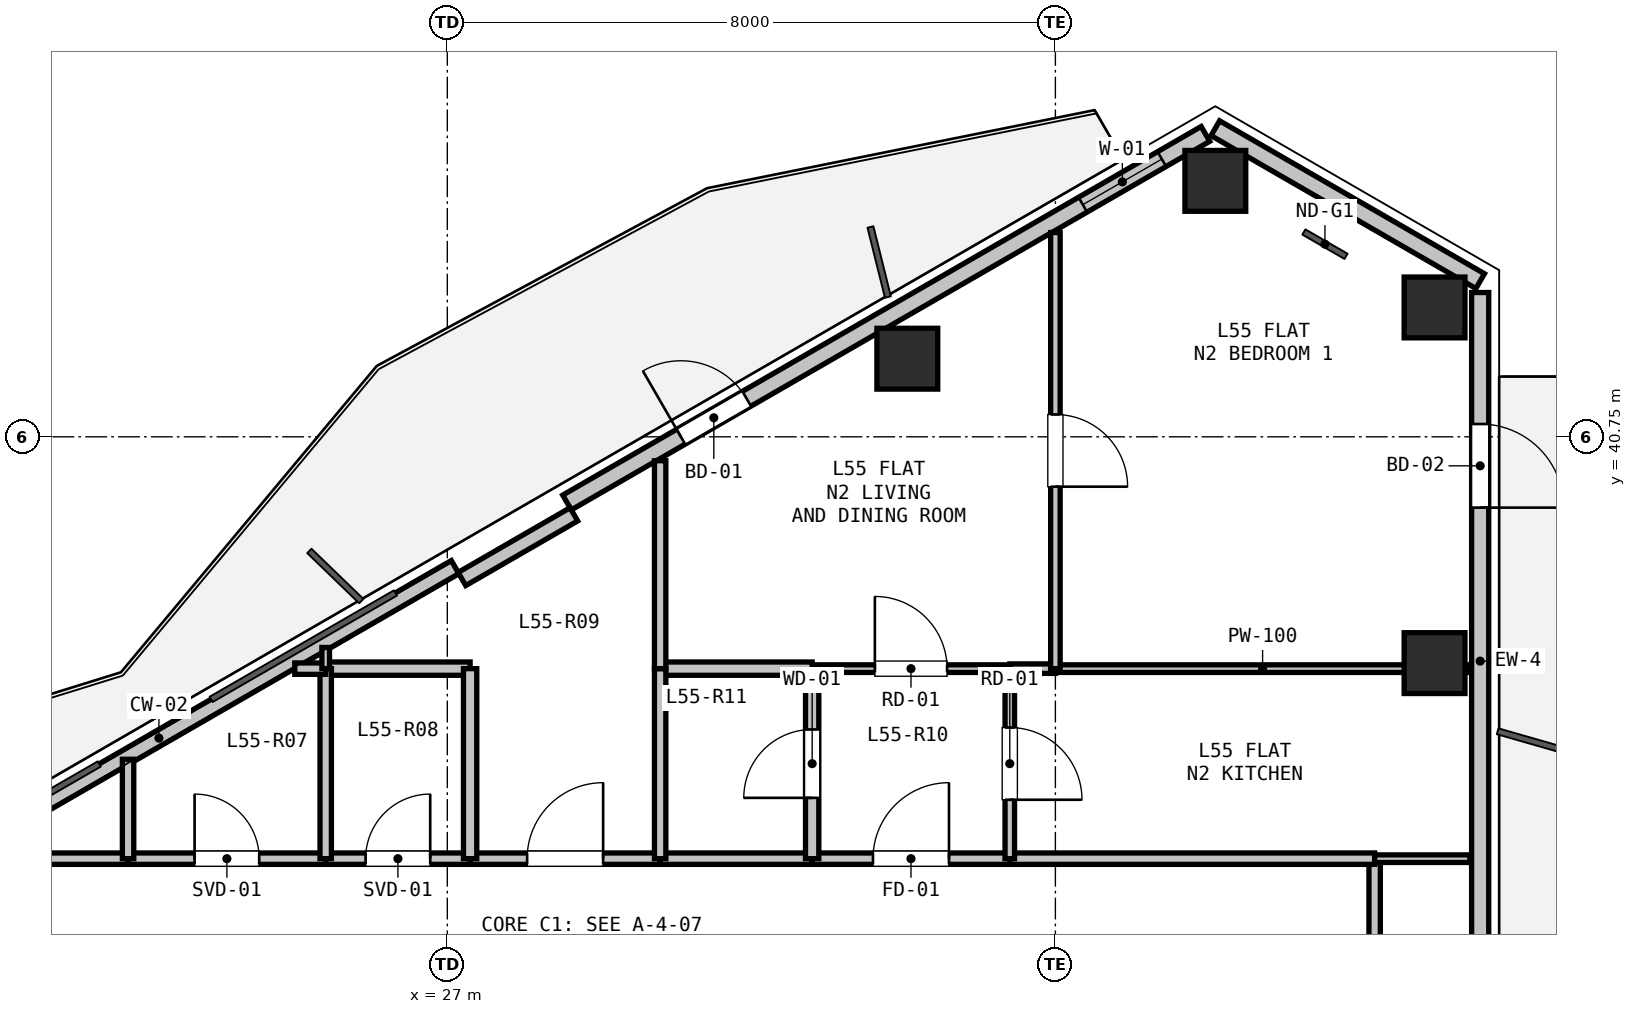
"""IFC4 building model, lengths in metres.
Left out: names, types, materials, properties, quantities, classifications, styles, units other than length and angle.
Written with IfcOpenShell. Run it as: python <this file> out.ifc"""

import sys

from ifc_helpers import new_model, si_unit, direction, frame, frame_2d, origin, origin_2d, place, context, subcontext, project, spatial, rectangle, hollow_rectangle, extrude, element, fill, save


model = new_model("IFC4")
c1 = context("Model", 3, precision=1e-05, world=origin(), true_north=direction((0.0, 1.0)))
c2 = subcontext(c1, "Body", "Model", "MODEL_VIEW")
j1 = project(units=[si_unit("LENGTHUNIT", "METRE"), si_unit("PLANEANGLEUNIT", "RADIAN")], contexts=[c1])
p1 = place(None, origin())
s1 = spatial("IfcSite", under=j1, at=p1, CompositionType="ELEMENT")
p2 = place(p1, origin())
s2 = spatial("IfcBuilding", under=s1, at=p2, CompositionType="ELEMENT")
p3 = place(p2, frame((0.0, 0.0, 198.6)))
s3 = spatial("IfcBuildingStorey", under=s2, at=p3, CompositionType="ELEMENT", Elevation=198.6)
for number, where, z_axis, x_axis in (
    (1, (33.052, 41.778, 0.0), (0.0, 0.0, 1.0), (1.0, 0.0, 0.0)),
    (2, (37.104, 44.117, 0.0), (0.0, 0.0, 1.0), (1.0, 0.0, 0.0)),
    (3, (39.988, 42.452, 0.0), (0.0, 0.0, 1.0), (1.0, 0.0, 0.0)),
    (4, (39.988, 37.773, 0.0), (0.0, 0.0, 1.0), (1.0, 0.0, 0.0)),
):
    element("IfcColumn", number, at=place(p3, frame(where, z_axis=z_axis, x_axis=x_axis)), inside=s3, PredefinedType="COLUMN", context=c2, shape_type="SweptSolid", body=[
        extrude(hollow_rectangle(XDim=0.8, YDim=0.8, WallThickness=0.025, at=origin_2d()), origin(), (0.0, 0.0, 1.0), 3.3),
    ])
p4 = place(p3, frame((37.104, 44.81, 0.0), z_axis=(0.0, 0.0, 1.0), x_axis=(0.866023907196, -0.500002592159, 0.0)))
e5 = element("IfcWall", 5, at=p4, inside=s3, PredefinedType="SOLIDWALL", context=c2, shape_type="SweptSolid", body=[
    extrude(rectangle(XDim=4.023, YDim=0.225, at=frame_2d((2.012, 0.0))), origin(), (0.0, 0.0, 1.0), 2.69),
])
p5 = place(p3, frame((19.309, 34.536, 0.0), z_axis=(0.0, 0.0, 1.0), x_axis=(0.866020680503, 0.500008180874, 0.0)))
e6 = element("IfcWall", 6, at=p5, inside=s3, PredefinedType="PARAPET", context=c2, shape_type="SweptSolid", body=[
    extrude(rectangle(XDim=8.999, YDim=0.2, at=frame_2d((4.5, 0.0))), origin(), (0.0, 0.0, 1.0), 0.2),
])
p6 = place(p3, frame((28.575, 39.885, 0.0), z_axis=(0.0, 0.0, 1.0), x_axis=(0.866016233231, 0.500015883528, 0.0)))
e7 = element("IfcWall", 7, at=p6, inside=s3, PredefinedType="SOLIDWALL", context=c2, shape_type="SweptSolid", body=[
    extrude(rectangle(XDim=9.699, YDim=0.225, at=frame_2d((4.85, 0.0))), origin(), (0.0, 0.0, 1.0), 2.69),
])
p7 = place(p6, frame((1.73, 0.0, 0.0)))
e8 = element("IfcOpeningElement", 8, at=p7, cuts=e7, PredefinedType="OPENING", context=c2, shape_type="SweptSolid", body=[
    extrude(rectangle(XDim=1.0, YDim=2.1, at=frame_2d((0.5, 1.05))), frame((0.0, 0.123, 0.0), z_axis=(0.0, -1.0, 0.0), x_axis=(1.0, 0.0, 0.0)), (0.0, 0.0, 1.0), 0.245),
])
p8 = place(p6, frame((7.836, 0.0, 0.9)))
e9 = element("IfcOpeningElement", 9, at=p8, cuts=e7, PredefinedType="OPENING", context=c2, shape_type="SweptSolid", body=[
    extrude(rectangle(XDim=1.2, YDim=1.4, at=frame_2d((0.6, 0.7))), frame((0.0, 0.123, 0.0), z_axis=(0.0, -1.0, 0.0), x_axis=(1.0, 0.0, 0.0)), (0.0, 0.0, 1.0), 0.245),
])
p9 = place(p3, frame((27.192, 38.88, 0.0), z_axis=(0.0, 0.0, 1.0), x_axis=(0.866025371046, 0.500000056704, 0.0)))
e10 = element("IfcWall", 10, at=p9, inside=s3, PredefinedType="PARAPET", context=c2, shape_type="SweptSolid", body=[
    extrude(rectangle(XDim=1.7, YDim=0.2, at=frame_2d((0.85, 0.0))), origin(), (0.0, 0.0, 1.0), 2.69),
])
p10 = place(p3, frame((40.588, 42.648, 0.0), z_axis=(0.0, 0.0, 1.0), x_axis=(0.0, -1.0, 0.0)))
e11 = element("IfcWall", 11, at=p10, inside=s3, PredefinedType="SOLIDWALL", context=c2, shape_type="SweptSolid", body=[
    extrude(rectangle(XDim=9.699, YDim=0.225, at=frame_2d((4.85, 0.0))), origin(), (0.0, 0.0, 1.0), 2.69),
])
p11 = place(p10, frame((1.73, 0.0, 0.0)))
e12 = element("IfcOpeningElement", 12, at=p11, cuts=e11, PredefinedType="OPENING", context=c2, shape_type="SweptSolid", body=[
    extrude(rectangle(XDim=1.1, YDim=2.1, at=frame_2d((0.55, 1.05))), frame((0.0, 0.123, 0.0), z_axis=(0.0, -1.0, 0.0), x_axis=(1.0, 0.0, 0.0)), (0.0, 0.0, 1.0), 0.245),
])
p12 = place(p3, frame((39.2, 35.2, 0.0), z_axis=(0.0, 0.0, 1.0), x_axis=(0.0, -1.0, 0.0)))
e13 = element("IfcWall", 13, at=p12, inside=s3, PredefinedType="PARTITIONING", context=c2, shape_type="SweptSolid", body=[
    extrude(rectangle(XDim=1.6, YDim=0.15, at=frame_2d((0.8, 0.0))), origin(), (0.0, 0.0, 1.0), 3.07),
])
p13 = place(p3, frame((20.528, 35.2, 0.0), z_axis=(0.0, 0.0, 1.0), x_axis=(1.0, 0.0, 0.0)))
e14 = element("IfcWall", 14, at=p13, inside=s3, PredefinedType="PARTITIONING", context=c2, shape_type="SweptSolid", body=[
    extrude(rectangle(XDim=2.272, YDim=0.15, at=frame_2d((1.136, 0.0))), origin(), (0.0, 0.0, 1.0), 2.365),
])
p14 = place(p3, frame((22.8, 35.2, 0.0), z_axis=(0.0, 0.0, 1.0), x_axis=(1.0, 0.0, 0.0)))
e15 = element("IfcWall", 15, at=p14, inside=s3, PredefinedType="PARTITIONING", context=c2, shape_type="SweptSolid", body=[
    extrude(rectangle(XDim=2.6, YDim=0.15, at=frame_2d((1.3, 0.0))), origin(), (0.0, 0.0, 1.0), 3.07),
])
p15 = place(p14, frame((0.875, 0.0, 0.0)))
e16 = element("IfcOpeningElement", 16, at=p15, cuts=e15, PredefinedType="OPENING", context=c2, shape_type="SweptSolid", body=[
    extrude(rectangle(XDim=0.85, YDim=2.1, at=frame_2d((0.425, 1.05))), frame((0.0, 0.085, 0.0), z_axis=(0.0, -1.0, 0.0), x_axis=(1.0, 0.0, 0.0)), (0.0, 0.0, 1.0), 0.17),
])
p16 = place(p3, frame((25.4, 35.2, 0.0), z_axis=(0.0, 0.0, 1.0), x_axis=(1.0, 0.0, 0.0)))
e17 = element("IfcWall", 17, at=p16, inside=s3, PredefinedType="PARTITIONING", context=c2, shape_type="SweptSolid", body=[
    extrude(rectangle(XDim=1.9, YDim=0.15, at=frame_2d((0.95, 0.0))), origin(), (0.0, 0.0, 1.0), 3.07),
])
p17 = place(p16, frame((0.525, 0.0, 0.0)))
e18 = element("IfcOpeningElement", 18, at=p17, cuts=e17, PredefinedType="OPENING", context=c2, shape_type="SweptSolid", body=[
    extrude(rectangle(XDim=0.85, YDim=2.1, at=frame_2d((0.425, 1.05))), frame((0.0, 0.085, 0.0), z_axis=(0.0, -1.0, 0.0), x_axis=(1.0, 0.0, 0.0)), (0.0, 0.0, 1.0), 0.17),
])
p18 = place(p3, frame((27.3, 35.2, 0.0), z_axis=(0.0, 0.0, 1.0), x_axis=(1.0, 0.0, 0.0)))
e19 = element("IfcWall", 19, at=p18, inside=s3, PredefinedType="PARTITIONING", context=c2, shape_type="SweptSolid", body=[
    extrude(rectangle(XDim=2.5, YDim=0.15, at=frame_2d((1.25, 0.0))), origin(), (0.0, 0.0, 1.0), 3.07),
])
p19 = place(p18, frame((0.75, 0.0, 0.0)))
e20 = element("IfcOpeningElement", 20, at=p19, cuts=e19, PredefinedType="OPENING", context=c2, shape_type="SweptSolid", body=[
    extrude(rectangle(XDim=1.0, YDim=2.15, at=frame_2d((0.5, 1.075))), frame((0.0, 0.085, 0.0), z_axis=(0.0, -1.0, 0.0), x_axis=(1.0, 0.0, 0.0)), (0.0, 0.0, 1.0), 0.17),
])
p20 = place(p3, frame((29.8, 35.2, 0.0), z_axis=(0.0, 0.0, 1.0), x_axis=(1.0, 0.0, 0.0)))
e21 = element("IfcWall", 21, at=p20, inside=s3, PredefinedType="PARTITIONING", context=c2, shape_type="SweptSolid", body=[
    extrude(rectangle(XDim=2.0, YDim=0.15, at=frame_2d((1.0, 0.0))), origin(), (0.0, 0.0, 1.0), 3.07),
])
p21 = place(p3, frame((31.8, 35.2, 0.0), z_axis=(0.0, 0.0, 1.0), x_axis=(1.0, 0.0, 0.0)))
e22 = element("IfcWall", 22, at=p21, inside=s3, PredefinedType="PARTITIONING", context=c2, shape_type="SweptSolid", body=[
    extrude(rectangle(XDim=2.6, YDim=0.15, at=frame_2d((1.3, 0.0))), origin(), (0.0, 0.0, 1.0), 3.07),
])
p22 = place(p21, frame((0.8, 0.0, 0.0)))
e23 = element("IfcOpeningElement", 23, at=p22, cuts=e22, PredefinedType="OPENING", context=c2, shape_type="SweptSolid", body=[
    extrude(rectangle(XDim=1.0, YDim=2.15, at=frame_2d((0.5, 1.075))), frame((0.0, 0.085, 0.0), z_axis=(0.0, -1.0, 0.0), x_axis=(1.0, 0.0, 0.0)), (0.0, 0.0, 1.0), 0.17),
])
p23 = place(p3, frame((34.4, 35.2, 0.0), z_axis=(0.0, 0.0, 1.0), x_axis=(1.0, 0.0, 0.0)))
e24 = element("IfcWall", 24, at=p23, inside=s3, PredefinedType="PARTITIONING", context=c2, shape_type="SweptSolid", body=[
    extrude(rectangle(XDim=4.8, YDim=0.15, at=frame_2d((2.4, 0.0))), origin(), (0.0, 0.0, 1.0), 2.518),
])
p24 = place(p3, frame((31.8, 37.7, 0.0), z_axis=(0.0, 0.0, 1.0), x_axis=(1.0, 0.0, 0.0)))
e25 = element("IfcWall", 25, at=p24, inside=s3, PredefinedType="PARTITIONING", context=c2, shape_type="SweptSolid", body=[
    extrude(rectangle(XDim=2.6, YDim=0.1, at=frame_2d((1.3, 0.0))), origin(), (0.0, 0.0, 1.0), 3.07),
])
p25 = place(p24, frame((0.825, 0.0, 0.0)))
e26 = element("IfcOpeningElement", 26, at=p25, cuts=e25, PredefinedType="OPENING", context=c2, shape_type="SweptSolid", body=[
    extrude(rectangle(XDim=0.95, YDim=2.1, at=frame_2d((0.475, 1.05))), frame((0.0, 0.06, 0.0), z_axis=(0.0, -1.0, 0.0), x_axis=(1.0, 0.0, 0.0)), (0.0, 0.0, 1.0), 0.12),
])
p26 = place(p3, frame((34.4, 37.7, 0.0), z_axis=(0.0, 0.0, 1.0), x_axis=(0.0, -1.0, 0.0)))
e27 = element("IfcWall", 27, at=p26, inside=s3, PredefinedType="PARTITIONING", context=c2, shape_type="SweptSolid", body=[
    extrude(rectangle(XDim=2.5, YDim=0.125, at=frame_2d((1.25, 0.0))), origin(), (0.0, 0.0, 1.0), 3.07),
])
p27 = place(p26, frame((0.775, 0.0, 0.0)))
e28 = element("IfcOpeningElement", 28, at=p27, cuts=e27, PredefinedType="OPENING", context=c2, shape_type="SweptSolid", body=[
    extrude(rectangle(XDim=0.95, YDim=2.1, at=frame_2d((0.475, 1.05))), frame((0.0, 0.073, 0.0), z_axis=(0.0, -1.0, 0.0), x_axis=(1.0, 0.0, 0.0)), (0.0, 0.0, 1.0), 0.145),
])
p28 = place(p3, frame((31.8, 35.2, 0.0), z_axis=(0.0, 0.0, 1.0), x_axis=(0.0, 1.0, 0.0)))
e29 = element("IfcWall", 29, at=p28, inside=s3, PredefinedType="PLUMBINGWALL", context=c2, shape_type="SweptSolid", body=[
    extrude(rectangle(XDim=2.5, YDim=0.175, at=frame_2d((1.25, 0.0))), origin(), (0.0, 0.0, 1.0), 3.07),
])
p29 = place(p28, frame((0.8, 0.0, 0.0)))
e30 = element("IfcOpeningElement", 30, at=p29, cuts=e29, PredefinedType="OPENING", context=c2, shape_type="SweptSolid", body=[
    extrude(rectangle(XDim=0.9, YDim=2.1, at=frame_2d((0.45, 1.05))), frame((0.0, 0.097, 0.0), z_axis=(0.0, -1.0, 0.0), x_axis=(1.0, 0.0, 0.0)), (0.0, 0.0, 1.0), 0.195),
])
p30 = place(p3, frame((25.4, 37.7, 0.0), z_axis=(0.0, 0.0, 1.0), x_axis=(1.0, 0.0, 0.0)))
e31 = element("IfcWall", 31, at=p30, inside=s3, PredefinedType="PLUMBINGWALL", context=c2, shape_type="SweptSolid", body=[
    extrude(rectangle(XDim=1.9, YDim=0.175, at=frame_2d((0.95, 0.0))), origin(), (0.0, 0.0, 1.0), 2.365),
])
p31 = place(p3, frame((27.3, 37.7, 0.0), z_axis=(0.0, 0.0, 1.0), x_axis=(0.0, -1.0, 0.0)))
e32 = element("IfcWall", 32, at=p31, inside=s3, PredefinedType="PLUMBINGWALL", context=c2, shape_type="SweptSolid", body=[
    extrude(rectangle(XDim=2.5, YDim=0.175, at=frame_2d((1.25, 0.0))), origin(), (0.0, 0.0, 1.0), 3.07),
])
p32 = place(p3, frame((25.4, 35.2, 0.0), z_axis=(0.0, 0.0, 1.0), x_axis=(0.0, 1.0, 0.0)))
e33 = element("IfcWall", 33, at=p32, inside=s3, PredefinedType="PARTITIONING", context=c2, shape_type="SweptSolid", body=[
    extrude(rectangle(XDim=2.5, YDim=0.15, at=frame_2d((1.25, 0.0))), origin(), (0.0, 0.0, 1.0), 2.365),
])
p33 = place(p3, frame((29.8, 37.7, 0.0), z_axis=(0.0, 0.0, 1.0), x_axis=(1.0, 0.0, 0.0)))
e34 = element("IfcWall", 34, at=p33, inside=s3, PredefinedType="PLUMBINGWALL", context=c2, shape_type="SweptSolid", body=[
    extrude(rectangle(XDim=2.0, YDim=0.175, at=frame_2d((1.0, 0.0))), origin(), (0.0, 0.0, 1.0), 3.07),
])
p34 = place(p3, frame((29.8, 35.2, 0.0), z_axis=(0.0, 0.0, 1.0), x_axis=(0.0, 1.0, 0.0)))
e35 = element("IfcWall", 35, at=p34, inside=s3, PredefinedType="PARTITIONING", context=c2, shape_type="SweptSolid", body=[
    extrude(rectangle(XDim=2.5, YDim=0.15, at=frame_2d((1.25, 0.0))), origin(), (0.0, 0.0, 1.0), 3.07),
])
p35 = place(p3, frame((40.452, 35.2, 0.0), z_axis=(0.0, 0.0, 1.0), x_axis=(-1.0, 0.0, 0.0)))
e36 = element("IfcWall", 36, at=p35, inside=s3, PredefinedType="PARTITIONING", context=c2, shape_type="SweptSolid", body=[
    extrude(rectangle(XDim=1.252, YDim=0.1, at=frame_2d((0.626, 0.0))), origin(), (0.0, 0.0, 1.0), 2.365),
])
p36 = place(p3, frame((34.4, 37.7, 0.0), z_axis=(0.0, 0.0, 1.0), x_axis=(1.0, 0.0, 0.0)))
e37 = element("IfcWall", 37, at=p36, inside=s3, PredefinedType="PARTITIONING", context=c2, shape_type="SweptSolid", body=[
    extrude(rectangle(XDim=0.6, YDim=0.125, at=frame_2d((0.3, 0.0))), origin(), (0.0, 0.0, 1.0), 3.07),
])
p37 = place(p3, frame((35.0, 37.7, 0.0), z_axis=(0.0, 0.0, 1.0), x_axis=(1.0, 0.0, 0.0)))
e38 = element("IfcWall", 38, at=p37, inside=s3, PredefinedType="PARTITIONING", context=c2, shape_type="SweptSolid", body=[
    extrude(rectangle(XDim=5.452, YDim=0.1, at=frame_2d((2.726, 0.0))), origin(), (0.0, 0.0, 1.0), 2.518),
])
p38 = place(p3, frame((24.993, 37.7, 0.0), z_axis=(0.0, 0.0, 1.0), x_axis=(1.0, 0.0, 0.0)))
e39 = element("IfcWall", 39, at=p38, inside=s3, PredefinedType="PARTITIONING", context=c2, shape_type="SweptSolid", body=[
    extrude(rectangle(XDim=0.407, YDim=0.15, at=frame_2d((0.203, 0.0))), origin(), (0.0, 0.0, 1.0), 3.07),
])
p39 = place(p3, frame((22.8, 35.2, 0.0), z_axis=(0.0, 0.0, 1.0), x_axis=(0.0, 1.0, 0.0)))
e40 = element("IfcWall", 40, at=p39, inside=s3, PredefinedType="PARTITIONING", context=c2, shape_type="SweptSolid", body=[
    extrude(rectangle(XDim=1.308, YDim=0.15, at=frame_2d((0.654, 0.0))), origin(), (0.0, 0.0, 1.0), 2.365),
])
p40 = place(p3, frame((29.8, 40.435, 0.0), z_axis=(0.0, 0.0, 1.0), x_axis=(0.0, -1.0, 0.0)))
e41 = element("IfcWall", 41, at=p40, inside=s3, PredefinedType="PARTITIONING", context=c2, shape_type="SweptSolid", body=[
    extrude(rectangle(XDim=2.735, YDim=0.15, at=frame_2d((1.368, 0.0))), origin(), (0.0, 0.0, 1.0), 2.365),
])
p41 = place(p3, frame((25.4, 37.7, 0.0), z_axis=(0.0, 0.0, 1.0), x_axis=(0.0, 1.0, 0.0)))
e42 = element("IfcWall", 42, at=p41, inside=s3, PredefinedType="PARTITIONING", context=c2, shape_type="SweptSolid", body=[
    extrude(rectangle(XDim=0.279, YDim=0.1, at=frame_2d((0.139, 0.0))), origin(), (0.0, 0.0, 1.0), 3.07),
])
p42 = place(p3, frame((35.0, 43.438, 0.0), z_axis=(0.0, 0.0, 1.0), x_axis=(0.0, -1.0, 0.0)))
e43 = element("IfcWall", 43, at=p42, inside=s3, PredefinedType="PARTITIONING", context=c2, shape_type="SweptSolid", body=[
    extrude(rectangle(XDim=5.738, YDim=0.125, at=frame_2d((2.869, 0.0))), origin(), (0.0, 0.0, 1.0), 2.795),
])
p43 = place(p42, frame((2.394, 0.0, 0.0)))
e44 = element("IfcOpeningElement", 44, at=p43, cuts=e43, PredefinedType="OPENING", context=c2, shape_type="SweptSolid", body=[
    extrude(rectangle(XDim=0.95, YDim=2.1, at=frame_2d((0.475, 1.05))), frame((0.0, 0.073, 0.0), z_axis=(0.0, -1.0, 0.0), x_axis=(1.0, 0.0, 0.0)), (0.0, 0.0, 1.0), 0.145),
])
p44 = place(p7, origin())
e45 = element("IfcDoor", 45, at=p44, inside=s3, OperationType="SINGLE_SWING_LEFT", PredefinedType="DOOR", context=c2, shape_type="SweptSolid", body=[
    extrude(rectangle(XDim=1.0, YDim=2.1, at=frame_2d((0.5, 1.05))), frame((0.0, 0.025, 0.0), z_axis=(0.0, -1.0, 0.0), x_axis=(1.0, 0.0, 0.0)), (0.0, 0.0, 1.0), 0.05),
])
fill(e8, e45)
p45 = place(p8, origin())
e46 = element("IfcWindow", 46, at=p45, inside=s3, PartitioningType="SINGLE_PANEL", PredefinedType="WINDOW", context=c2, shape_type="SweptSolid", body=[
    extrude(rectangle(XDim=1.2, YDim=1.4, at=frame_2d((0.6, 0.7))), frame((0.0, 0.03, 0.0), z_axis=(0.0, -1.0, 0.0), x_axis=(1.0, 0.0, 0.0)), (0.0, 0.0, 1.0), 0.06),
])
fill(e9, e46)
p46 = place(p11, origin())
e47 = element("IfcDoor", 47, at=p46, inside=s3, OperationType="SINGLE_SWING_RIGHT", PredefinedType="DOOR", context=c2, shape_type="SweptSolid", body=[
    extrude(rectangle(XDim=1.1, YDim=2.1, at=frame_2d((0.55, 1.05))), frame((0.0, 0.025, 0.0), z_axis=(0.0, -1.0, 0.0), x_axis=(1.0, 0.0, 0.0)), (0.0, 0.0, 1.0), 0.05),
])
fill(e12, e47)
p47 = place(p22, origin())
e48 = element("IfcDoor", 48, at=p47, inside=s3, OperationType="SINGLE_SWING_RIGHT", PredefinedType="DOOR", context=c2, shape_type="SweptSolid", body=[
    extrude(rectangle(XDim=1.0, YDim=2.15, at=frame_2d((0.5, 1.075))), frame((0.0, 0.025, 0.0), z_axis=(0.0, -1.0, 0.0), x_axis=(1.0, 0.0, 0.0)), (0.0, 0.0, 1.0), 0.05),
])
fill(e23, e48)
p48 = place(p17, origin())
e49 = element("IfcDoor", 49, at=p48, inside=s3, OperationType="SINGLE_SWING_RIGHT", PredefinedType="DOOR", context=c2, shape_type="SweptSolid", body=[
    extrude(rectangle(XDim=0.85, YDim=2.1, at=frame_2d((0.425, 1.05))), frame((0.0, 0.025, 0.0), z_axis=(0.0, -1.0, 0.0), x_axis=(1.0, 0.0, 0.0)), (0.0, 0.0, 1.0), 0.05),
])
fill(e18, e49)
p49 = place(p15, origin())
e50 = element("IfcDoor", 50, at=p49, inside=s3, OperationType="SINGLE_SWING_LEFT", PredefinedType="DOOR", context=c2, shape_type="SweptSolid", body=[
    extrude(rectangle(XDim=0.85, YDim=2.1, at=frame_2d((0.425, 1.05))), frame((0.0, 0.025, 0.0), z_axis=(0.0, -1.0, 0.0), x_axis=(1.0, 0.0, 0.0)), (0.0, 0.0, 1.0), 0.05),
])
fill(e16, e50)
p50 = place(p19, origin())
e51 = element("IfcDoor", 51, at=p50, inside=s3, OperationType="SINGLE_SWING_RIGHT", PredefinedType="DOOR", context=c2, shape_type="SweptSolid", body=[
    extrude(rectangle(XDim=1.0, YDim=2.15, at=frame_2d((0.5, 1.075))), frame((0.0, 0.025, 0.0), z_axis=(0.0, -1.0, 0.0), x_axis=(1.0, 0.0, 0.0)), (0.0, 0.0, 1.0), 0.05),
])
fill(e20, e51)
p51 = place(p29, origin())
e52 = element("IfcDoor", 52, at=p51, inside=s3, OperationType="SINGLE_SWING_LEFT", PredefinedType="DOOR", context=c2, shape_type="SweptSolid", body=[
    extrude(rectangle(XDim=0.9, YDim=2.1, at=frame_2d((0.45, 1.05))), frame((0.0, 0.025, 0.0), z_axis=(0.0, -1.0, 0.0), x_axis=(1.0, 0.0, 0.0)), (0.0, 0.0, 1.0), 0.05),
])
fill(e30, e52)
p52 = place(p27, origin())
e53 = element("IfcDoor", 53, at=p52, inside=s3, OperationType="SINGLE_SWING_RIGHT", PredefinedType="DOOR", context=c2, shape_type="SweptSolid", body=[
    extrude(rectangle(XDim=0.95, YDim=2.1, at=frame_2d((0.475, 1.05))), frame((0.0, 0.025, 0.0), z_axis=(0.0, -1.0, 0.0), x_axis=(1.0, 0.0, 0.0)), (0.0, 0.0, 1.0), 0.05),
])
fill(e28, e53)
p53 = place(p25, origin())
e54 = element("IfcDoor", 54, at=p53, inside=s3, OperationType="SINGLE_SWING_LEFT", PredefinedType="DOOR", context=c2, shape_type="SweptSolid", body=[
    extrude(rectangle(XDim=0.95, YDim=2.1, at=frame_2d((0.475, 1.05))), frame((0.0, 0.025, 0.0), z_axis=(0.0, -1.0, 0.0), x_axis=(1.0, 0.0, 0.0)), (0.0, 0.0, 1.0), 0.05),
])
fill(e26, e54)
p54 = place(p43, origin())
e55 = element("IfcDoor", 55, at=p54, inside=s3, OperationType="SINGLE_SWING_RIGHT", PredefinedType="DOOR", context=c2, shape_type="SweptSolid", body=[
    extrude(rectangle(XDim=0.95, YDim=2.1, at=frame_2d((0.475, 1.05))), frame((0.0, 0.025, 0.0), z_axis=(0.0, -1.0, 0.0), x_axis=(1.0, 0.0, 0.0)), (0.0, 0.0, 1.0), 0.05),
])
fill(e44, e55)
save(model, sys.argv[1])
